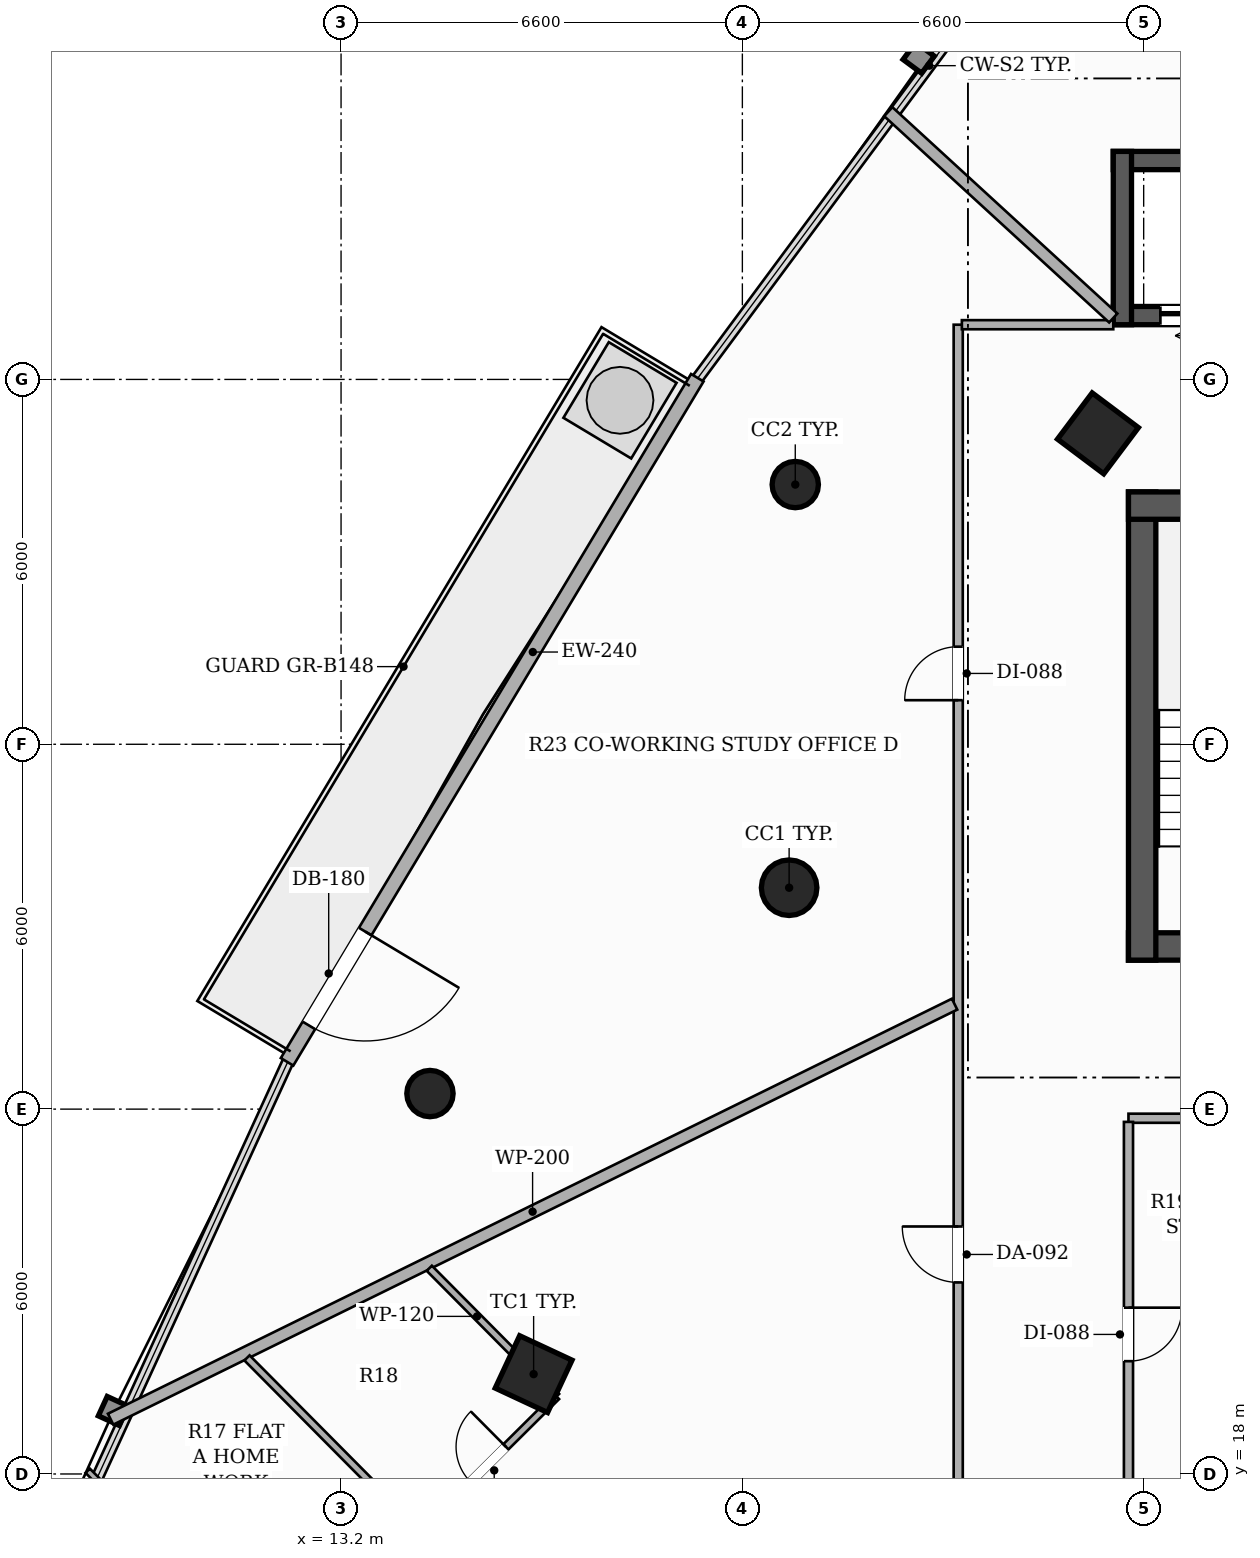
"""IFC4 building model, lengths in metres.
Left out: names, types, materials, properties, quantities, classifications, styles, units other than length and angle.
Written with IfcOpenShell. Run it as: python <this file> out.ifc"""

import sys

from ifc_helpers import new_model, si_unit, direction, frame, frame_2d, origin, origin_2d, place, context, subcontext, project, spatial, rectangle, hollow_rectangle, hollow_circle, extrude, element, fill, save


model = new_model("IFC4")
c1 = context("Model", 3, precision=1e-05, world=origin(), true_north=direction((0.0, 1.0)))
c2 = subcontext(c1, "Body", "Model", "MODEL_VIEW")
j1 = project(units=[si_unit("LENGTHUNIT", "METRE"), si_unit("PLANEANGLEUNIT", "RADIAN")], contexts=[c1])
p1 = place(None, origin())
s1 = spatial("IfcSite", under=j1, at=p1, CompositionType="ELEMENT")
p2 = place(p1, origin())
s2 = spatial("IfcBuilding", under=s1, at=p2, CompositionType="ELEMENT")
p3 = place(p2, frame((0.0, 0.0, 36.8)))
s3 = spatial("IfcBuildingStorey", under=s2, at=p3, CompositionType="ELEMENT", Elevation=36.8)
p4 = place(p3, frame((26.15, 26.675, 0.0), z_axis=(0.0, 0.0, 1.0), x_axis=(1.0, 0.0, 0.0)))
e1 = element("IfcWall", 1, at=p4, inside=s3, PredefinedType="SHEAR", context=c2, shape_type="SweptSolid", body=[
    extrude(rectangle(XDim=13.7, YDim=0.45, at=frame_2d((6.85, 0.0))), origin(), (0.0, 0.0, 1.0), 3.3),
])
p5 = place(p4, frame((4.35, 0.0, 0.0)))
e2 = element("IfcOpeningElement", 2, at=p5, cuts=e1, PredefinedType="OPENING", context=c2, shape_type="SweptSolid", body=[
    extrude(rectangle(XDim=1.05, YDim=2.15, at=frame_2d((0.525, 1.075))), frame((0.0, 0.235, 0.0), z_axis=(0.0, -1.0, 0.0), x_axis=(1.0, 0.0, 0.0)), (0.0, 0.0, 1.0), 0.47),
])
p6 = place(p4, frame((8.3, 0.0, 0.0)))
e3 = element("IfcOpeningElement", 3, at=p6, cuts=e1, PredefinedType="OPENING", context=c2, shape_type="SweptSolid", body=[
    extrude(rectangle(XDim=1.05, YDim=2.15, at=frame_2d((0.525, 1.075))), frame((0.0, 0.235, 0.0), z_axis=(0.0, -1.0, 0.0), x_axis=(1.0, 0.0, 0.0)), (0.0, 0.0, 1.0), 0.47),
])
p7 = place(p3, frame((26.375, 26.45, 0.0), z_axis=(0.0, 0.0, 1.0), x_axis=(0.0, 1.0, 0.0)))
e4 = element("IfcWall", 4, at=p7, inside=s3, PredefinedType="SHEAR", context=c2, shape_type="SweptSolid", body=[
    extrude(rectangle(XDim=7.7, YDim=0.45, at=frame_2d((3.85, 0.0))), origin(), (0.0, 0.0, 1.0), 3.3),
])
p8 = place(p3, frame((26.15, 33.925, 0.0), z_axis=(0.0, 0.0, 1.0), x_axis=(1.0, 0.0, 0.0)))
e5 = element("IfcWall", 5, at=p8, inside=s3, PredefinedType="SHEAR", context=c2, shape_type="SweptSolid", body=[
    extrude(rectangle(XDim=3.75, YDim=0.45, at=frame_2d((1.875, 0.0))), origin(), (0.0, 0.0, 1.0), 3.3),
])
p9 = place(p3, frame((40.1, 37.05, 0.0), z_axis=(0.0, 0.0, 1.0), x_axis=(-1.0, 0.0, 0.0)))
e6 = element("IfcWall", 6, at=p9, inside=s3, PredefinedType="SHEAR", context=c2, shape_type="SweptSolid", body=[
    extrude(rectangle(XDim=14.2, YDim=0.3, at=frame_2d((7.1, 0.0))), origin(), (0.0, 0.0, 1.0), 3.3),
])
p10 = place(p9, frame((12.325, 0.0, 0.0)))
e7 = element("IfcOpeningElement", 7, at=p10, cuts=e6, PredefinedType="OPENING", context=c2, shape_type="SweptSolid", body=[
    extrude(rectangle(XDim=1.1, YDim=2.2, at=frame_2d((0.55, 1.1))), frame((0.0, 0.16, 0.0), z_axis=(0.0, -1.0, 0.0), x_axis=(1.0, 0.0, 0.0)), (0.0, 0.0, 1.0), 0.32),
])
p11 = place(p9, frame((0.775, 0.0, 0.0)))
e8 = element("IfcOpeningElement", 8, at=p11, cuts=e6, PredefinedType="OPENING", context=c2, shape_type="SweptSolid", body=[
    extrude(rectangle(XDim=1.1, YDim=2.2, at=frame_2d((0.55, 1.1))), frame((0.0, 0.16, 0.0), z_axis=(0.0, -1.0, 0.0), x_axis=(1.0, 0.0, 0.0)), (0.0, 0.0, 1.0), 0.32),
])
p12 = place(p3, frame((25.9, 39.6, 0.0), z_axis=(0.0, 0.0, 1.0), x_axis=(1.0, 0.0, 0.0)))
e9 = element("IfcWall", 9, at=p12, inside=s3, PredefinedType="SHEAR", context=c2, shape_type="SweptSolid", body=[
    extrude(rectangle(XDim=14.2, YDim=0.3, at=frame_2d((7.1, 0.0))), origin(), (0.0, 0.0, 1.0), 3.3),
])
p13 = place(p3, frame((26.05, 36.9, 0.0), z_axis=(0.0, 0.0, 1.0), x_axis=(0.0, 1.0, 0.0)))
e10 = element("IfcWall", 10, at=p13, inside=s3, PredefinedType="SHEAR", context=c2, shape_type="SweptSolid", body=[
    extrude(rectangle(XDim=2.85, YDim=0.3, at=frame_2d((1.425, 0.0))), origin(), (0.0, 0.0, 1.0), 3.3),
])
p14 = place(p3, frame((25.648, 35.113, 0.0), z_axis=(0.0, 0.0, 1.0), x_axis=(0.600420225326, 0.799684658487, 0.0)))
e11 = element("IfcColumn", 11, at=p14, inside=s3, PredefinedType="COLUMN", context=c2, shape_type="SweptSolid", body=[
    extrude(hollow_rectangle(XDim=0.95, YDim=0.95, WallThickness=0.032, at=origin_2d()), origin(), (0.0, 0.0, 1.0), 3.3),
])
p15 = place(p3, frame((20.569, 27.641, 0.0), z_axis=(0.0, 0.0, 1.0), x_axis=(1.0, 0.0, 0.0)))
e12 = element("IfcColumn", 12, at=p15, inside=s3, PredefinedType="COLUMN", context=c2, shape_type="SweptSolid", body=[
    extrude(hollow_circle(Radius=0.457, WallThickness=0.025, at=origin_2d()), origin(), (0.0, 0.0, 1.0), 3.3),
])
p16 = place(p3, frame((16.367, 19.642, 0.0), z_axis=(0.0, 0.0, 1.0), x_axis=(0.422618261741, 0.906307787037, 0.0)))
e13 = element("IfcColumn", 13, at=p16, inside=s3, PredefinedType="COLUMN", context=c2, shape_type="SweptSolid", body=[
    extrude(hollow_rectangle(XDim=0.95, YDim=0.95, WallThickness=0.032, at=origin_2d()), origin(), (0.0, 0.0, 1.0), 3.3),
])
for number, where, z_axis, x_axis in (
    (14, (20.67, 34.271, 0.0), (0.0, 0.0, 1.0), (1.0, 0.0, 0.0)),
    (15, (14.662, 24.256, 0.0), (0.0, 0.0, 1.0), (1.0, 0.0, 0.0)),
):
    element("IfcColumn", number, at=place(p3, frame(where, z_axis=z_axis, x_axis=x_axis)), inside=s3, PredefinedType="COLUMN", context=c2, shape_type="SweptSolid", body=[
        extrude(hollow_circle(Radius=0.381, WallThickness=0.022, at=origin_2d()), origin(), (0.0, 0.0, 1.0), 3.3),
    ])
p17 = place(p3, frame((19.059, 36.028, 0.0), z_axis=(0.0, 0.0, 1.0), x_axis=(-0.514331531946, -0.857591438417, 0.0)))
e16 = element("IfcWall", 16, at=p17, inside=s3, PredefinedType="SOLIDWALL", context=c2, shape_type="SweptSolid", body=[
    extrude(rectangle(XDim=13.118, YDim=0.24, at=frame_2d((6.559, 0.0))), origin(), (0.0, 0.0, 1.0), 2.624),
])
p18 = place(p17, frame((10.62, 0.0, 0.0)))
e17 = element("IfcOpeningElement", 17, at=p18, cuts=e16, PredefinedType="OPENING", context=c2, shape_type="SweptSolid", body=[
    extrude(rectangle(XDim=1.8, YDim=2.2, at=frame_2d((0.9, 1.1))), frame((0.0, 0.13, 0.0), z_axis=(0.0, -1.0, 0.0), x_axis=(1.0, 0.0, 0.0)), (0.0, 0.0, 1.0), 0.26),
])
p19 = place(p3, frame((23.35, 11.86, 0.0), z_axis=(0.0, 0.0, 1.0), x_axis=(0.0, 1.0, 0.0)))
e18 = element("IfcWall", 18, at=p19, inside=s3, PredefinedType="PARTITIONING", context=c2, shape_type="SweptSolid", body=[
    extrude(rectangle(XDim=25.04, YDim=0.15, at=frame_2d((12.52, 0.0))), origin(), (0.0, 0.0, 1.0), 2.413),
])
p20 = place(p19, frame((9.29, 0.0, 0.0)))
e19 = element("IfcOpeningElement", 19, at=p20, cuts=e18, PredefinedType="OPENING", context=c2, shape_type="SweptSolid", body=[
    extrude(rectangle(XDim=0.92, YDim=2.15, at=frame_2d((0.46, 1.075))), frame((0.0, 0.085, 0.0), z_axis=(0.0, -1.0, 0.0), x_axis=(1.0, 0.0, 0.0)), (0.0, 0.0, 1.0), 0.17),
])
p21 = place(p19, frame((18.865, 0.0, 0.0)))
e20 = element("IfcOpeningElement", 20, at=p21, cuts=e18, PredefinedType="OPENING", context=c2, shape_type="SweptSolid", body=[
    extrude(rectangle(XDim=0.88, YDim=2.1, at=frame_2d((0.44, 1.05))), frame((0.0, 0.085, 0.0), z_axis=(0.0, -1.0, 0.0), x_axis=(1.0, 0.0, 0.0)), (0.0, 0.0, 1.0), 0.17),
])
p22 = place(p19, frame((2.566, 0.0, 0.0)))
e21 = element("IfcOpeningElement", 21, at=p22, cuts=e18, PredefinedType="OPENING", context=c2, shape_type="SweptSolid", body=[
    extrude(rectangle(XDim=0.92, YDim=2.15, at=frame_2d((0.46, 1.075))), frame((0.0, 0.085, 0.0), z_axis=(0.0, -1.0, 0.0), x_axis=(1.0, 0.0, 0.0)), (0.0, 0.0, 1.0), 0.17),
])
p23 = place(p3, frame((23.41, 36.9, 0.0), z_axis=(0.0, 0.0, 1.0), x_axis=(1.0, 0.0, 0.0)))
e22 = element("IfcWall", 22, at=p23, inside=s3, PredefinedType="PARTITIONING", context=c2, shape_type="SweptSolid", body=[
    extrude(rectangle(XDim=2.49, YDim=0.15, at=frame_2d((1.245, 0.0))), origin(), (0.0, 0.0, 1.0), 2.413),
])
p24 = place(p3, frame((31.545, 23.85, 0.0), z_axis=(0.0, 0.0, 1.0), x_axis=(-1.0, 0.0, 0.0)))
e23 = element("IfcWall", 23, at=p24, inside=s3, PredefinedType="PARTITIONING", context=c2, shape_type="SweptSolid", body=[
    extrude(rectangle(XDim=5.395, YDim=0.15, at=frame_2d((2.698, 0.0))), origin(), (0.0, 0.0, 1.0), 2.669),
])
p25 = place(p3, frame((26.15, 23.79, 0.0), z_axis=(0.0, 0.0, 1.0), x_axis=(0.0, -1.0, 0.0)))
e24 = element("IfcWall", 24, at=p25, inside=s3, PredefinedType="PARTITIONING", context=c2, shape_type="SweptSolid", body=[
    extrude(rectangle(XDim=6.99, YDim=0.15, at=frame_2d((3.495, 0.0))), origin(), (0.0, 0.0, 1.0), 2.669),
])
p26 = place(p25, frame((3.055, 0.0, 0.0)))
e25 = element("IfcOpeningElement", 25, at=p26, cuts=e24, PredefinedType="OPENING", context=c2, shape_type="SweptSolid", body=[
    extrude(rectangle(XDim=0.88, YDim=2.1, at=frame_2d((0.44, 1.05))), frame((0.0, 0.085, 0.0), z_axis=(0.0, -1.0, 0.0), x_axis=(1.0, 0.0, 0.0)), (0.0, 0.0, 1.0), 0.17),
])
p27 = place(p3, frame((9.41, 18.901, 0.0), z_axis=(0.0, 0.0, 1.0), x_axis=(0.89737804177, 0.44126256373, 0.0)))
e26 = element("IfcWall", 26, at=p27, inside=s3, PredefinedType="PARTITIONING", context=c2, shape_type="SweptSolid", body=[
    extrude(rectangle(XDim=15.468, YDim=0.2, at=frame_2d((7.734, 0.0))), origin(), (0.0, 0.0, 1.0), 2.413),
])
p28 = place(p3, frame((25.9, 37.01, 0.0), z_axis=(0.0, 0.0, 1.0), x_axis=(-0.737010798249, 0.675880968266, 0.0)))
e27 = element("IfcWall", 27, at=p28, inside=s3, PredefinedType="PARTITIONING", context=c2, shape_type="SweptSolid", body=[
    extrude(rectangle(XDim=5.02, YDim=0.2, at=frame_2d((2.51, 0.0))), origin(), (0.0, 0.0, 1.0), 3.06),
])
p29 = place(p3, frame((14.497, 17.043, 0.0), z_axis=(0.0, 0.0, 1.0), x_axis=(0.709608291954, 0.704596389425, 0.0)))
e28 = element("IfcWall", 28, at=p29, inside=s3, PredefinedType="PARTITIONING", context=c2, shape_type="SweptSolid", body=[
    extrude(rectangle(XDim=3.166, YDim=0.12, at=frame_2d((1.583, 0.0))), origin(), (0.0, 0.0, 1.0), 2.413),
])
p30 = place(p29, frame((1.173, 0.0, 0.0)))
e29 = element("IfcOpeningElement", 29, at=p30, cuts=e28, PredefinedType="OPENING", context=c2, shape_type="SweptSolid", body=[
    extrude(rectangle(XDim=0.82, YDim=2.1, at=frame_2d((0.41, 1.05))), frame((0.0, 0.07, 0.0), z_axis=(0.0, -1.0, 0.0), x_axis=(1.0, 0.0, 0.0)), (0.0, 0.0, 1.0), 0.14),
])
p31 = place(p3, frame((16.744, 19.274, 0.0), z_axis=(0.0, 0.0, 1.0), x_axis=(-0.704390177625, 0.709812987811, 0.0)))
e30 = element("IfcWall", 30, at=p31, inside=s3, PredefinedType="PARTITIONING", context=c2, shape_type="SweptSolid", body=[
    extrude(rectangle(XDim=2.971, YDim=0.12, at=frame_2d((1.486, 0.0))), origin(), (0.0, 0.0, 1.0), 2.413),
])
p32 = place(p3, frame((14.497, 17.043, 0.0), z_axis=(0.0, 0.0, 1.0), x_axis=(-0.704380529073, 0.70982256252, 0.0)))
e31 = element("IfcWall", 31, at=p32, inside=s3, PredefinedType="PARTITIONING", context=c2, shape_type="SweptSolid", body=[
    extrude(rectangle(XDim=4.038, YDim=0.12, at=frame_2d((2.019, 0.0))), origin(), (0.0, 0.0, 1.0), 2.413),
])
p33 = place(p3, frame((9.033, 18.053, 0.0), z_axis=(0.0, 0.0, 1.0), x_axis=(0.704374497722, -0.709828547579, 0.0)))
e32 = element("IfcWall", 32, at=p33, inside=s3, PredefinedType="PARTITIONING", context=c2, shape_type="SweptSolid", body=[
    extrude(rectangle(XDim=4.566, YDim=0.1, at=frame_2d((2.283, 0.0))), origin(), (0.0, 0.0, 1.0), 2.413),
])
p34 = place(p18, origin())
e33 = element("IfcDoor", 33, at=p34, inside=s3, OperationType="SINGLE_SWING_LEFT", PredefinedType="DOOR", context=c2, shape_type="SweptSolid", body=[
    extrude(rectangle(XDim=1.8, YDim=2.2, at=frame_2d((0.9, 1.1))), frame((0.0, 0.025, 0.0), z_axis=(0.0, -1.0, 0.0), x_axis=(1.0, 0.0, 0.0)), (0.0, 0.0, 1.0), 0.05),
])
fill(e17, e33)
p35 = place(p10, origin())
e34 = element("IfcDoor", 34, at=p35, inside=s3, OperationType="DOUBLE_DOOR_SLIDING", PredefinedType="DOOR", context=c2, shape_type="SweptSolid", body=[
    extrude(rectangle(XDim=1.1, YDim=2.2, at=frame_2d((0.55, 1.1))), frame((0.0, 0.025, 0.0), z_axis=(0.0, -1.0, 0.0), x_axis=(1.0, 0.0, 0.0)), (0.0, 0.0, 1.0), 0.05),
])
fill(e7, e34)
p36 = place(p20, origin())
e35 = element("IfcDoor", 35, at=p36, inside=s3, OperationType="SINGLE_SWING_RIGHT", PredefinedType="DOOR", context=c2, shape_type="SweptSolid", body=[
    extrude(rectangle(XDim=0.92, YDim=2.15, at=frame_2d((0.46, 1.075))), frame((0.0, 0.025, 0.0), z_axis=(0.0, -1.0, 0.0), x_axis=(1.0, 0.0, 0.0)), (0.0, 0.0, 1.0), 0.05),
])
fill(e19, e35)
p37 = place(p30, origin())
e36 = element("IfcDoor", 36, at=p37, inside=s3, OperationType="SINGLE_SWING_RIGHT", PredefinedType="DOOR", context=c2, shape_type="SweptSolid", body=[
    extrude(rectangle(XDim=0.82, YDim=2.1, at=frame_2d((0.41, 1.05))), frame((0.0, 0.025, 0.0), z_axis=(0.0, -1.0, 0.0), x_axis=(1.0, 0.0, 0.0)), (0.0, 0.0, 1.0), 0.05),
])
fill(e29, e36)
p38 = place(p21, origin())
e37 = element("IfcDoor", 37, at=p38, inside=s3, OperationType="SINGLE_SWING_LEFT", PredefinedType="DOOR", context=c2, shape_type="SweptSolid", body=[
    extrude(rectangle(XDim=0.88, YDim=2.1, at=frame_2d((0.44, 1.05))), frame((0.0, 0.025, 0.0), z_axis=(0.0, -1.0, 0.0), x_axis=(1.0, 0.0, 0.0)), (0.0, 0.0, 1.0), 0.05),
])
fill(e20, e37)
p39 = place(p26, origin())
e38 = element("IfcDoor", 38, at=p39, inside=s3, OperationType="SINGLE_SWING_LEFT", PredefinedType="DOOR", context=c2, shape_type="SweptSolid", body=[
    extrude(rectangle(XDim=0.88, YDim=2.1, at=frame_2d((0.44, 1.05))), frame((0.0, 0.025, 0.0), z_axis=(0.0, -1.0, 0.0), x_axis=(1.0, 0.0, 0.0)), (0.0, 0.0, 1.0), 0.05),
])
fill(e25, e38)
save(model, sys.argv[1])
